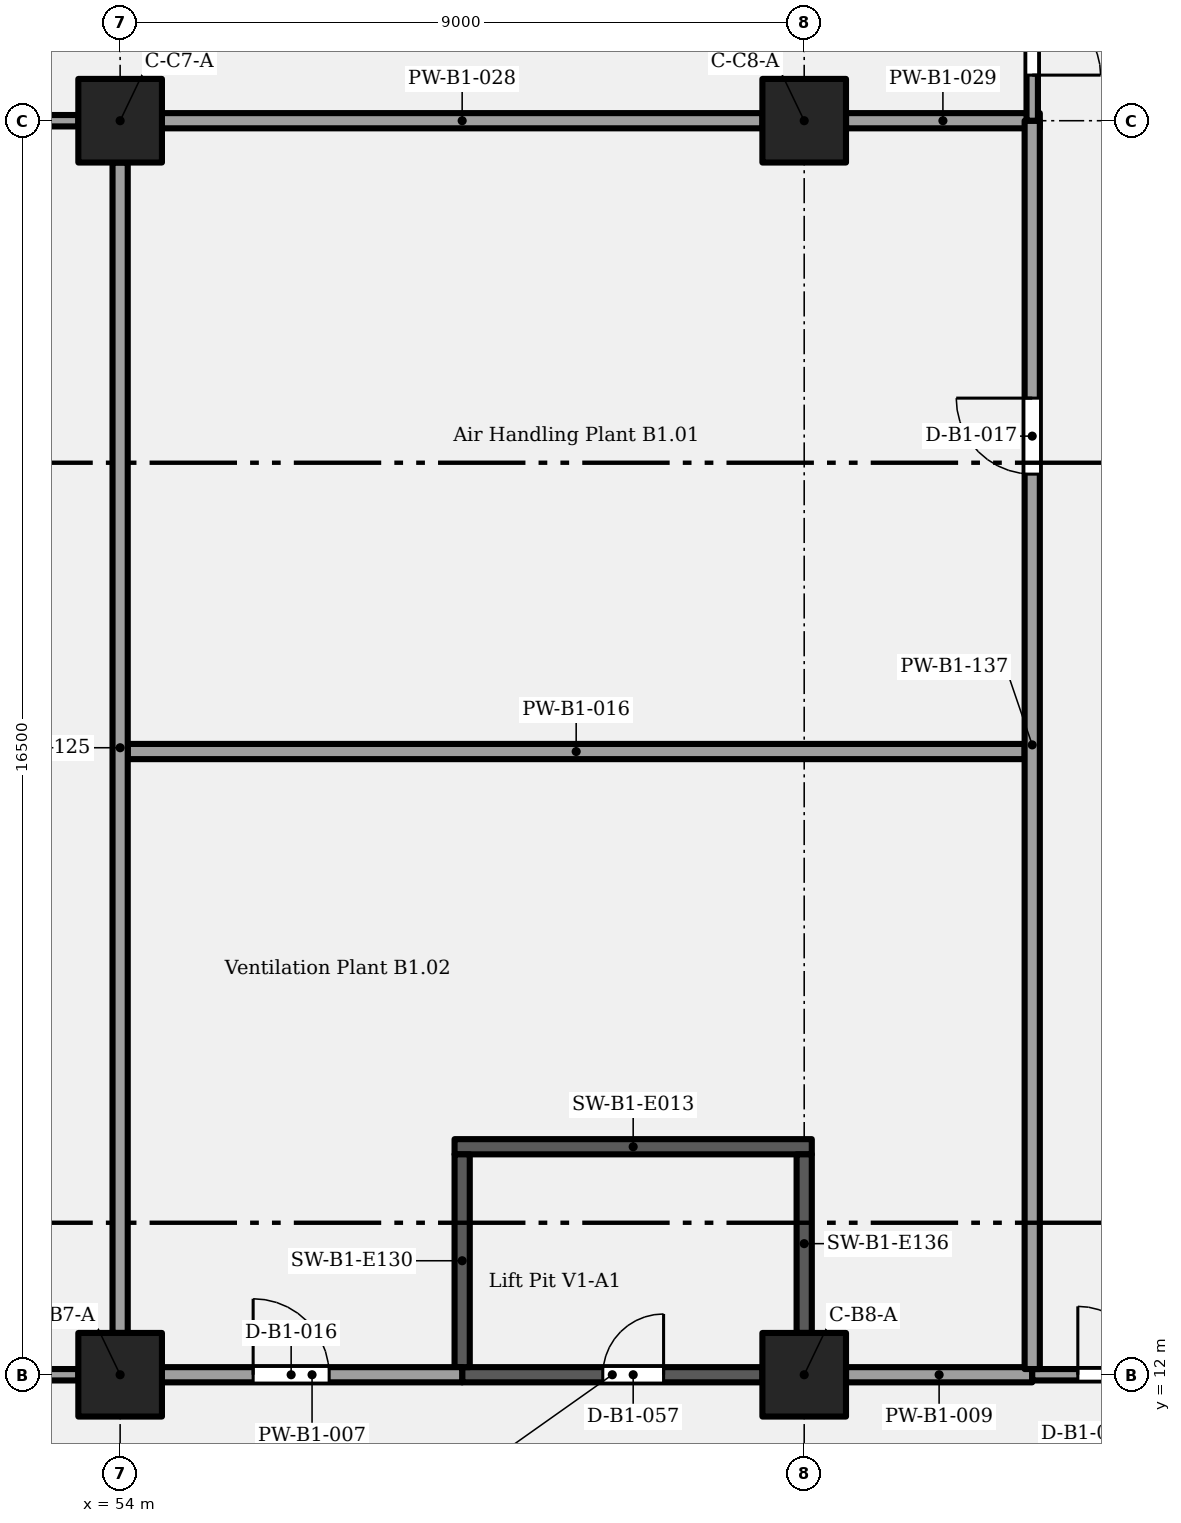
"""IFC4 building model, lengths in metres.
Left out: names, types, materials, properties, quantities, classifications, styles, units other than length and angle.
Written with IfcOpenShell. Run it as: python <this file> out.ifc"""

import sys

from ifc_helpers import new_model, si_unit, direction, frame, frame_2d, origin, origin_2d, place, context, subcontext, project, spatial, rectangle, extrude, element, fill, save


model = new_model("IFC4")
c1 = context("Model", 3, precision=1e-05, world=origin(), true_north=direction((0.0, 1.0)))
c2 = subcontext(c1, "Body", "Model", "MODEL_VIEW")
j1 = project(units=[si_unit("LENGTHUNIT", "METRE"), si_unit("PLANEANGLEUNIT", "RADIAN")], contexts=[c1])
p1 = place(None, origin())
s1 = spatial("IfcSite", under=j1, at=p1, CompositionType="ELEMENT")
p2 = place(p1, origin())
s2 = spatial("IfcBuilding", under=s1, at=p2, CompositionType="ELEMENT")
p3 = place(p2, frame((0.0, 0.0, -4.2)))
s3 = spatial("IfcBuildingStorey", under=s2, at=p3, CompositionType="ELEMENT", Elevation=-4.2)
for number, where, z_axis, x_axis in (
    (1, (54.0, 12.0, 0.0), (0.0, 0.0, 1.0), (1.0, 0.0, 0.0)),
    (2, (63.0, 12.0, 0.0), (0.0, 0.0, 1.0), (1.0, 0.0, 0.0)),
    (3, (54.0, 28.5, 0.0), (0.0, 0.0, 1.0), (1.0, 0.0, 0.0)),
    (4, (63.0, 28.5, 0.0), (0.0, 0.0, 1.0), (1.0, 0.0, 0.0)),
):
    element("IfcColumn", number, at=place(p3, frame(where, z_axis=z_axis, x_axis=x_axis)), inside=s3, PredefinedType="COLUMN", context=c2, shape_type="SweptSolid", body=[
        extrude(rectangle(XDim=1.1, YDim=1.1, at=origin_2d()), origin(), (0.0, 0.0, 1.0), 4.2),
    ])
p4 = place(p3, frame((45.55, 12.0, 0.0), z_axis=(0.0, 0.0, 1.0), x_axis=(1.0, 0.0, 0.0)))
e5 = element("IfcWall", 5, at=p4, inside=s3, PredefinedType="PARTITIONING", context=c2, shape_type="SweptSolid", body=[
    extrude(rectangle(XDim=7.9, YDim=0.15, at=frame_2d((3.95, 0.0))), origin(), (0.0, 0.0, 1.0), 3.15),
])
p5 = place(p4, frame((3.45, 0.0, 0.0)))
e6 = element("IfcOpeningElement", 6, at=p5, cuts=e5, PredefinedType="OPENING", context=c2, shape_type="SweptSolid", body=[
    extrude(rectangle(XDim=1.0, YDim=2.1, at=frame_2d((0.5, 1.05))), frame((0.0, 0.085, 0.0), z_axis=(0.0, -1.0, 0.0), x_axis=(1.0, 0.0, 0.0)), (0.0, 0.0, 1.0), 0.17),
])
p6 = place(p3, frame((54.55, 12.0, 0.0), z_axis=(0.0, 0.0, 1.0), x_axis=(1.0, 0.0, 0.0)))
e7 = element("IfcWall", 7, at=p6, inside=s3, PredefinedType="PARTITIONING", context=c2, shape_type="SweptSolid", body=[
    extrude(rectangle(XDim=3.95, YDim=0.2, at=frame_2d((1.975, 0.0))), origin(), (0.0, 0.0, 1.0), 3.15),
])
p7 = place(p6, frame((1.2, 0.0, 0.0)))
e8 = element("IfcOpeningElement", 8, at=p7, cuts=e7, PredefinedType="OPENING", context=c2, shape_type="SweptSolid", body=[
    extrude(rectangle(XDim=1.0, YDim=2.1, at=frame_2d((0.5, 1.05))), frame((0.0, 0.11, 0.0), z_axis=(0.0, -1.0, 0.0), x_axis=(1.0, 0.0, 0.0)), (0.0, 0.0, 1.0), 0.22),
])
p8 = place(p3, frame((58.5, 12.0, 0.0), z_axis=(0.0, 0.0, 1.0), x_axis=(1.0, 0.0, 0.0)))
e9 = element("IfcWall", 9, at=p8, inside=s3, PredefinedType="SHEAR", context=c2, shape_type="SweptSolid", body=[
    extrude(rectangle(XDim=3.95, YDim=0.2, at=frame_2d((1.975, 0.0))), origin(), (0.0, 0.0, 1.0), 3.9),
])
p9 = place(p8, frame((1.85, 0.0, 0.0)))
e10 = element("IfcOpeningElement", 10, at=p9, cuts=e9, PredefinedType="OPENING", context=c2, shape_type="SweptSolid", body=[
    extrude(rectangle(XDim=0.8, YDim=2.0, at=frame_2d((0.4, 1.0))), frame((0.0, 0.11, 0.0), z_axis=(0.0, -1.0, 0.0), x_axis=(1.0, 0.0, 0.0)), (0.0, 0.0, 1.0), 0.22),
])
p10 = place(p3, frame((63.55, 12.0, 0.0), z_axis=(0.0, 0.0, 1.0), x_axis=(1.0, 0.0, 0.0)))
e11 = element("IfcWall", 11, at=p10, inside=s3, PredefinedType="PARTITIONING", context=c2, shape_type="SweptSolid", body=[
    extrude(rectangle(XDim=2.45, YDim=0.2, at=frame_2d((1.225, 0.0))), origin(), (0.0, 0.0, 1.0), 3.15),
])
p11 = place(p3, frame((66.0, 12.0, 0.0), z_axis=(0.0, 0.0, 1.0), x_axis=(1.0, 0.0, 0.0)))
e12 = element("IfcWall", 12, at=p11, inside=s3, PredefinedType="PARTITIONING", context=c2, shape_type="SweptSolid", body=[
    extrude(rectangle(XDim=5.55, YDim=0.15, at=frame_2d((2.775, 0.0))), origin(), (0.0, 0.0, 1.0), 3.15),
])
p12 = place(p11, frame((0.6, 0.0, 0.0)))
e13 = element("IfcOpeningElement", 13, at=p12, cuts=e12, PredefinedType="OPENING", context=c2, shape_type="SweptSolid", body=[
    extrude(rectangle(XDim=1.8, YDim=2.1, at=frame_2d((0.9, 1.05))), frame((0.0, 0.085, 0.0), z_axis=(0.0, -1.0, 0.0), x_axis=(1.0, 0.0, 0.0)), (0.0, 0.0, 1.0), 0.17),
])
p13 = place(p3, frame((58.4, 15.0, 0.0), z_axis=(0.0, 0.0, 1.0), x_axis=(1.0, 0.0, 0.0)))
e14 = element("IfcWall", 14, at=p13, inside=s3, PredefinedType="SHEAR", context=c2, shape_type="SweptSolid", body=[
    extrude(rectangle(XDim=4.7, YDim=0.2, at=frame_2d((2.35, 0.0))), origin(), (0.0, 0.0, 1.0), 3.9),
])
p14 = place(p3, frame((54.1, 20.2, 0.0), z_axis=(0.0, 0.0, 1.0), x_axis=(1.0, 0.0, 0.0)))
e15 = element("IfcWall", 15, at=p14, inside=s3, PredefinedType="PARTITIONING", context=c2, shape_type="SweptSolid", body=[
    extrude(rectangle(XDim=11.8, YDim=0.2, at=frame_2d((5.9, 0.0))), origin(), (0.0, 0.0, 1.0), 3.9),
])
p15 = place(p3, frame((45.55, 28.5, 0.0), z_axis=(0.0, 0.0, 1.0), x_axis=(1.0, 0.0, 0.0)))
e16 = element("IfcWall", 16, at=p15, inside=s3, PredefinedType="PARTITIONING", context=c2, shape_type="SweptSolid", body=[
    extrude(rectangle(XDim=7.9, YDim=0.15, at=frame_2d((3.95, 0.0))), origin(), (0.0, 0.0, 1.0), 3.15),
])
p16 = place(p3, frame((54.55, 28.5, 0.0), z_axis=(0.0, 0.0, 1.0), x_axis=(1.0, 0.0, 0.0)))
e17 = element("IfcWall", 17, at=p16, inside=s3, PredefinedType="PARTITIONING", context=c2, shape_type="SweptSolid", body=[
    extrude(rectangle(XDim=7.9, YDim=0.2, at=frame_2d((3.95, 0.0))), origin(), (0.0, 0.0, 1.0), 3.15),
])
p17 = place(p3, frame((63.55, 28.5, 0.0), z_axis=(0.0, 0.0, 1.0), x_axis=(1.0, 0.0, 0.0)))
e18 = element("IfcWall", 18, at=p17, inside=s3, PredefinedType="PARTITIONING", context=c2, shape_type="SweptSolid", body=[
    extrude(rectangle(XDim=2.55, YDim=0.2, at=frame_2d((1.275, 0.0))), origin(), (0.0, 0.0, 1.0), 3.15),
])
p18 = place(p3, frame((54.0, 12.55, 0.0), z_axis=(0.0, 0.0, 1.0), x_axis=(0.0, 1.0, 0.0)))
e19 = element("IfcWall", 19, at=p18, inside=s3, PredefinedType="PARTITIONING", context=c2, shape_type="SweptSolid", body=[
    extrude(rectangle(XDim=15.4, YDim=0.2, at=frame_2d((7.7, 0.0))), origin(), (0.0, 0.0, 1.0), 2.95),
])
p19 = place(p3, frame((58.5, 12.1, 0.0), z_axis=(0.0, 0.0, 1.0), x_axis=(0.0, 1.0, 0.0)))
e20 = element("IfcWall", 20, at=p19, inside=s3, PredefinedType="SHEAR", context=c2, shape_type="SweptSolid", body=[
    extrude(rectangle(XDim=2.8, YDim=0.2, at=frame_2d((1.4, 0.0))), origin(), (0.0, 0.0, 1.0), 3.9),
])
p20 = place(p3, frame((63.0, 12.55, 0.0), z_axis=(0.0, 0.0, 1.0), x_axis=(0.0, 1.0, 0.0)))
e21 = element("IfcWall", 21, at=p20, inside=s3, PredefinedType="SHEAR", context=c2, shape_type="SweptSolid", body=[
    extrude(rectangle(XDim=2.35, YDim=0.2, at=frame_2d((1.175, 0.0))), origin(), (0.0, 0.0, 1.0), 3.9),
])
p21 = place(p3, frame((66.0, 12.075, 0.0), z_axis=(0.0, 0.0, 1.0), x_axis=(0.0, 1.0, 0.0)))
e22 = element("IfcWall", 22, at=p21, inside=s3, PredefinedType="PARTITIONING", context=c2, shape_type="SweptSolid", body=[
    extrude(rectangle(XDim=16.425, YDim=0.2, at=frame_2d((8.212, 0.0))), origin(), (0.0, 0.0, 1.0), 3.9),
])
p22 = place(p21, frame((11.775, 0.0, 0.0)))
e23 = element("IfcOpeningElement", 23, at=p22, cuts=e22, PredefinedType="OPENING", context=c2, shape_type="SweptSolid", body=[
    extrude(rectangle(XDim=1.0, YDim=2.1, at=frame_2d((0.5, 1.05))), frame((0.0, 0.11, 0.0), z_axis=(0.0, -1.0, 0.0), x_axis=(1.0, 0.0, 0.0)), (0.0, 0.0, 1.0), 0.22),
])
p23 = place(p3, frame((66.0, 28.5, 0.0), z_axis=(0.0, 0.0, 1.0), x_axis=(0.0, 1.0, 0.0)))
e24 = element("IfcWall", 24, at=p23, inside=s3, PredefinedType="PARTITIONING", context=c2, shape_type="SweptSolid", body=[
    extrude(rectangle(XDim=3.0, YDim=0.15, at=frame_2d((1.5, 0.0))), origin(), (0.0, 0.0, 1.0), 3.9),
])
p24 = place(p23, frame((2.4, 0.0, 0.0), z_axis=(0.0, 0.0, 1.0), x_axis=(-1.0, 0.0, 0.0)))
e25 = element("IfcOpeningElement", 25, at=p24, cuts=e24, PredefinedType="OPENING", context=c2, shape_type="SweptSolid", body=[
    extrude(rectangle(XDim=1.8, YDim=2.1, at=frame_2d((0.9, 1.05))), frame((0.0, 0.085, 0.0), z_axis=(0.0, -1.0, 0.0), x_axis=(1.0, 0.0, 0.0)), (0.0, 0.0, 1.0), 0.17),
])
p25 = place(p12, origin())
e26 = element("IfcDoor", 26, at=p25, inside=s3, OperationType="DOUBLE_DOOR_SINGLE_SWING", PredefinedType="DOOR", context=c2, shape_type="SweptSolid", body=[
    extrude(rectangle(XDim=1.8, YDim=2.1, at=frame_2d((0.9, 1.05))), frame((0.0, 0.025, 0.0), z_axis=(0.0, -1.0, 0.0), x_axis=(1.0, 0.0, 0.0)), (0.0, 0.0, 1.0), 0.05),
])
fill(e13, e26)
p26 = place(p24, origin())
e27 = element("IfcDoor", 27, at=p26, inside=s3, OperationType="DOUBLE_DOOR_SINGLE_SWING", PredefinedType="DOOR", context=c2, shape_type="SweptSolid", body=[
    extrude(rectangle(XDim=1.8, YDim=2.1, at=frame_2d((0.9, 1.05))), frame((0.0, 0.025, 0.0), z_axis=(0.0, -1.0, 0.0), x_axis=(1.0, 0.0, 0.0)), (0.0, 0.0, 1.0), 0.05),
])
fill(e25, e27)
p27 = place(p7, origin())
e28 = element("IfcDoor", 28, at=p27, inside=s3, OperationType="SINGLE_SWING_LEFT", PredefinedType="DOOR", context=c2, shape_type="SweptSolid", body=[
    extrude(rectangle(XDim=1.0, YDim=2.1, at=frame_2d((0.5, 1.05))), frame((0.0, 0.025, 0.0), z_axis=(0.0, -1.0, 0.0), x_axis=(1.0, 0.0, 0.0)), (0.0, 0.0, 1.0), 0.05),
])
fill(e8, e28)
p28 = place(p22, origin())
e29 = element("IfcDoor", 29, at=p28, inside=s3, OperationType="SINGLE_SWING_RIGHT", PredefinedType="DOOR", context=c2, shape_type="SweptSolid", body=[
    extrude(rectangle(XDim=1.0, YDim=2.1, at=frame_2d((0.5, 1.05))), frame((0.0, 0.025, 0.0), z_axis=(0.0, -1.0, 0.0), x_axis=(1.0, 0.0, 0.0)), (0.0, 0.0, 1.0), 0.05),
])
fill(e23, e29)
p29 = place(p9, origin())
e30 = element("IfcDoor", 30, at=p29, inside=s3, OperationType="SINGLE_SWING_RIGHT", PredefinedType="DOOR", context=c2, shape_type="SweptSolid", body=[
    extrude(rectangle(XDim=0.8, YDim=2.0, at=frame_2d((0.4, 1.0))), frame((0.0, 0.025, 0.0), z_axis=(0.0, -1.0, 0.0), x_axis=(1.0, 0.0, 0.0)), (0.0, 0.0, 1.0), 0.05),
])
fill(e10, e30)
save(model, sys.argv[1])
